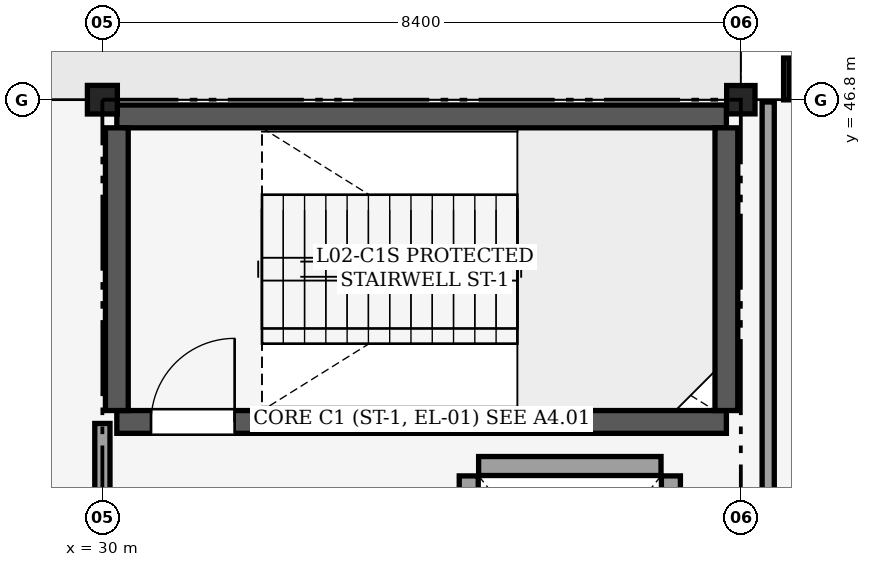
"""IFC4 building model, lengths in metres.
Left out: names, types, materials, properties, quantities, classifications, styles, units other than length and angle.
Written with IfcOpenShell. Run it as: python <this file> out.ifc"""

import sys

from ifc_helpers import new_model, si_unit, direction, frame, frame_2d, origin, origin_2d, place, context, subcontext, project, spatial, rectangle, i_section, extrude, element, fill, save


model = new_model("IFC4")
c1 = context("Model", 3, precision=1e-05, world=origin(), true_north=direction((0.0, 1.0)))
c2 = subcontext(c1, "Body", "Model", "MODEL_VIEW")
j1 = project(units=[si_unit("LENGTHUNIT", "METRE"), si_unit("PLANEANGLEUNIT", "RADIAN")], contexts=[c1])
p1 = place(None, origin())
s1 = spatial("IfcSite", under=j1, at=p1, CompositionType="ELEMENT")
p2 = place(p1, origin())
s2 = spatial("IfcBuilding", under=s1, at=p2, CompositionType="ELEMENT")
p3 = place(p2, frame((0.0, 0.0, 10.2)))
s3 = spatial("IfcBuildingStorey", under=s2, at=p3, CompositionType="ELEMENT", Elevation=10.2)
p4 = place(p3, frame((30.0, 46.8, 0.0), z_axis=(0.0, 0.0, 1.0), x_axis=(1.0, 0.0, 0.0)))
e1 = element("IfcColumn", 1, at=p4, inside=s3, PredefinedType="COLUMN", context=c2, shape_type="SweptSolid", body=[
    extrude(i_section(OverallWidth=0.394, OverallDepth=0.376, WebThickness=0.017, FlangeThickness=0.028, FilletRadius=0.025, at=origin_2d()), origin(), (0.0, 0.0, 1.0), 4.8),
])
p5 = place(p3, frame((38.4, 46.8, 0.0), z_axis=(0.0, 0.0, 1.0), x_axis=(1.0, 0.0, 0.0)))
e2 = element("IfcColumn", 2, at=p5, inside=s3, PredefinedType="COLUMN", context=c2, shape_type="SweptSolid", body=[
    extrude(i_section(OverallWidth=0.373, OverallDepth=0.373, WebThickness=0.016, FlangeThickness=0.026, FilletRadius=0.025, at=origin_2d()), origin(), (0.0, 0.0, 1.0), 4.8),
])
p6 = place(p3, frame((30.19, 42.56, 0.0), z_axis=(0.0, 0.0, 1.0), x_axis=(1.0, 0.0, 0.0)))
e3 = element("IfcWall", 3, at=p6, inside=s3, PredefinedType="SHEAR", context=c2, shape_type="SweptSolid", body=[
    extrude(rectangle(XDim=8.02, YDim=0.3, at=frame_2d((4.01, 0.0))), origin(), (0.0, 0.0, 1.0), 4.56),
])
p7 = place(p6, frame((0.45, 0.0, 0.0)))
e4 = element("IfcOpeningElement", 4, at=p7, cuts=e3, PredefinedType="OPENING", context=c2, shape_type="SweptSolid", body=[
    extrude(rectangle(XDim=1.1, YDim=2.15, at=frame_2d((0.55, 1.075))), frame((0.0, 0.16, 0.0), z_axis=(0.0, -1.0, 0.0), x_axis=(1.0, 0.0, 0.0)), (0.0, 0.0, 1.0), 0.321),
])
p8 = place(p3, frame((30.19, 46.58, 0.0), z_axis=(0.0, 0.0, 1.0), x_axis=(1.0, 0.0, 0.0)))
e5 = element("IfcWall", 5, at=p8, inside=s3, PredefinedType="SHEAR", context=c2, shape_type="SweptSolid", body=[
    extrude(rectangle(XDim=8.02, YDim=0.3, at=frame_2d((4.01, 0.0))), origin(), (0.0, 0.0, 1.0), 4.56),
])
for number, where, z_axis, x_axis in (
    (6, (30.19, 42.71, 0.0), (0.0, 0.0, 1.0), (0.0, 1.0, 0.0)),
    (7, (38.21, 42.71, 0.0), (0.0, 0.0, 1.0), (0.0, 1.0, 0.0)),
):
    element("IfcWall", number, at=place(p3, frame(where, z_axis=z_axis, x_axis=x_axis)), inside=s3, PredefinedType="SHEAR", context=c2, shape_type="SweptSolid", body=[
        extrude(rectangle(XDim=3.72, YDim=0.3, at=frame_2d((1.86, 0.0))), origin(), (0.0, 0.0, 1.0), 4.56),
    ])
p9 = place(p3, frame((37.48, 38.85, 0.0), z_axis=(0.0, 0.0, 1.0), x_axis=(0.0, 1.0, 0.0)))
e8 = element("IfcWall", 8, at=p9, inside=s3, PredefinedType="PARTITIONING", context=c2, shape_type="SweptSolid", body=[
    extrude(rectangle(XDim=3.0, YDim=0.25, at=frame_2d((1.5, 0.0))), origin(), (0.0, 0.0, 1.0), 4.56),
])
p10 = place(p3, frame((34.95, 41.98, 0.0), z_axis=(0.0, 0.0, 1.0), x_axis=(1.0, 0.0, 0.0)))
e9 = element("IfcWall", 9, at=p10, inside=s3, PredefinedType="PARTITIONING", context=c2, shape_type="SweptSolid", body=[
    extrude(rectangle(XDim=2.4, YDim=0.25, at=frame_2d((1.2, 0.0))), origin(), (0.0, 0.0, 1.0), 4.56),
])
p11 = place(p3, frame((34.82, 38.5, 0.0), z_axis=(0.0, 0.0, 1.0), x_axis=(0.0, 1.0, 0.0)))
e10 = element("IfcWall", 10, at=p11, inside=s3, PredefinedType="PARTITIONING", context=c2, shape_type="SweptSolid", body=[
    extrude(rectangle(XDim=3.35, YDim=0.25, at=frame_2d((1.675, 0.0))), origin(), (0.0, 0.0, 1.0), 4.56),
])
p12 = place(p11, frame((0.85, 0.0, 0.0)))
e11 = element("IfcOpeningElement", 11, at=p12, cuts=e10, PredefinedType="OPENING", context=c2, shape_type="SweptSolid", body=[
    extrude(rectangle(XDim=1.25, YDim=2.15, at=frame_2d((0.625, 1.075))), frame((0.0, 0.135, 0.0), z_axis=(0.0, -1.0, 0.0), x_axis=(1.0, 0.0, 0.0)), (0.0, 0.0, 1.0), 0.271),
])
p13 = place(p3, frame((30.0, 38.62, 0.0), z_axis=(0.0, 0.0, 1.0), x_axis=(0.0, 1.0, 0.0)))
e12 = element("IfcWall", 12, at=p13, inside=s3, PredefinedType="PARTITIONING", context=c2, shape_type="SweptSolid", body=[
    extrude(rectangle(XDim=3.92, YDim=0.2, at=frame_2d((1.96, 0.0))), origin(), (0.0, 0.0, 1.0), 3.684),
])
p14 = place(p3, frame((38.76, 38.41, 0.0), z_axis=(0.0, 0.0, 1.0), x_axis=(0.0, 1.0, 0.0)))
e13 = element("IfcWall", 13, at=p14, inside=s3, PredefinedType="PARTITIONING", context=c2, shape_type="SweptSolid", body=[
    extrude(rectangle(XDim=8.36, YDim=0.16, at=frame_2d((4.18, 0.0))), origin(), (0.0, 0.0, 1.0), 4.54),
])
p15 = place(p7, origin())
e14 = element("IfcDoor", 14, at=p15, inside=s3, OperationType="SINGLE_SWING_RIGHT", PredefinedType="DOOR", context=c2, shape_type="SweptSolid", body=[
    extrude(rectangle(XDim=1.1, YDim=2.15, at=frame_2d((0.55, 1.075))), frame((0.0, 0.025, 0.0), z_axis=(0.0, -1.0, 0.0), x_axis=(1.0, 0.0, 0.0)), (0.0, 0.0, 1.0), 0.05),
])
fill(e4, e14)
save(model, sys.argv[1])
